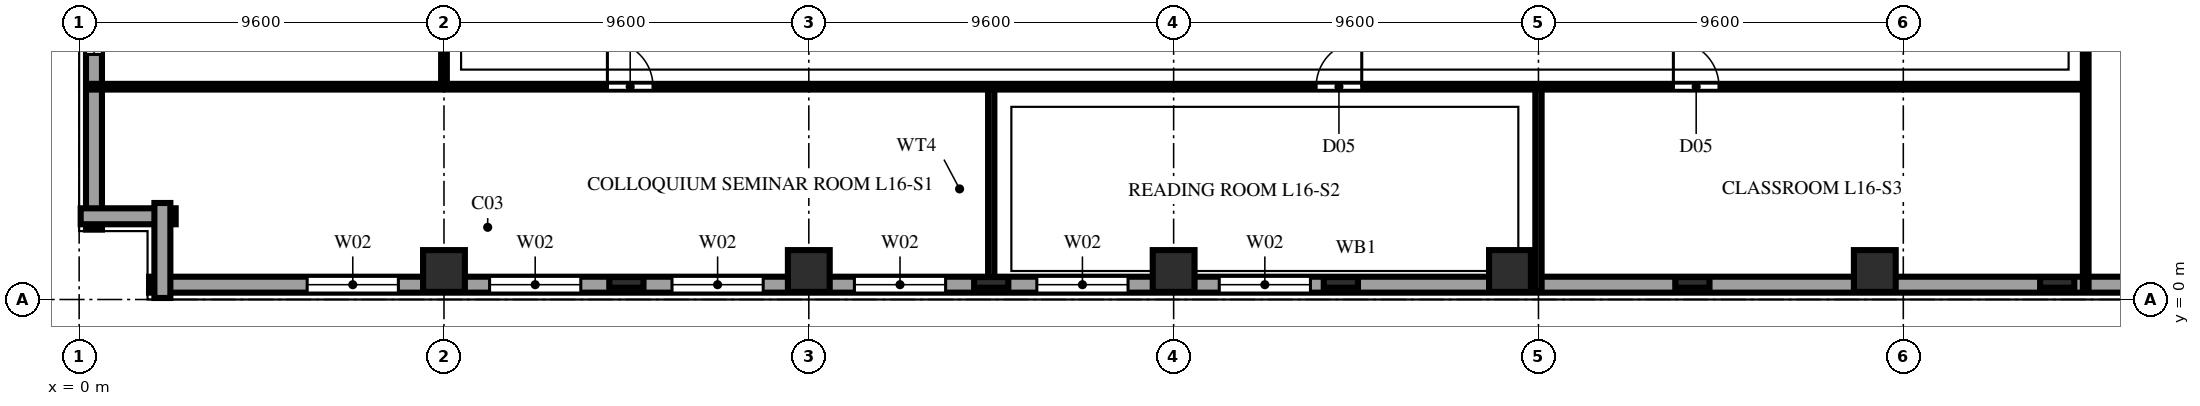
"""IFC4 building model, lengths in metres.
Left out: names, types, materials, properties, quantities, classifications, styles, units other than length and angle.
Written with IfcOpenShell. Run it as: python <this file> out.ifc"""

import sys

from ifc_helpers import new_model, si_unit, direction, frame, frame_2d, origin, origin_2d, place, context, subcontext, project, spatial, rectangle, extrude, element, fill, save


model = new_model("IFC4")
c1 = context("Model", 3, precision=1e-05, world=origin(), true_north=direction((0.0, 1.0)))
c2 = subcontext(c1, "Body", "Model", "MODEL_VIEW")
j1 = project(units=[si_unit("LENGTHUNIT", "METRE"), si_unit("PLANEANGLEUNIT", "RADIAN")], contexts=[c1])
p1 = place(None, origin())
s1 = spatial("IfcSite", under=j1, at=p1, CompositionType="ELEMENT")
p2 = place(p1, origin())
s2 = spatial("IfcBuilding", under=s1, at=p2, CompositionType="ELEMENT")
p3 = place(p2, frame((0.0, 0.0, 66.0)))
s3 = spatial("IfcBuildingStorey", under=s2, at=p3, CompositionType="ELEMENT", Elevation=66.0)
for number, where, z_axis, x_axis in (
    (1, (9.6, 0.75, 0.0), (0.0, 0.0, 1.0), (1.0, 0.0, 0.0)),
    (2, (19.2, 0.75, 0.0), (0.0, 0.0, 1.0), (1.0, 0.0, 0.0)),
    (3, (28.8, 0.75, 0.0), (0.0, 0.0, 1.0), (1.0, 0.0, 0.0)),
    (4, (37.65, 0.75, 0.0), (0.0, 0.0, 1.0), (1.0, 0.0, 0.0)),
    (5, (47.25, 0.75, 0.0), (0.0, 0.0, 1.0), (1.0, 0.0, 0.0)),
):
    element("IfcColumn", number, at=place(p3, frame(where, z_axis=z_axis, x_axis=x_axis)), inside=s3, PredefinedType="COLUMN", context=c2, shape_type="SweptSolid", body=[
        extrude(rectangle(XDim=1.1, YDim=1.1, at=origin_2d()), origin(), (0.0, 0.0, 1.0), 3.8),
    ])
for number, where, z_axis, x_axis in (
    (6, (14.4, 0.45, 0.0), (0.0, 0.0, 1.0), (1.0, 0.0, 0.0)),
    (7, (24.0, 0.45, 0.0), (0.0, 0.0, 1.0), (1.0, 0.0, 0.0)),
    (8, (33.2, 0.45, 0.0), (0.0, 0.0, 1.0), (1.0, 0.0, 0.0)),
    (9, (42.45, 0.45, 0.0), (0.0, 0.0, 1.0), (1.0, 0.0, 0.0)),
    (10, (52.05, 0.45, 0.0), (0.0, 0.0, 1.0), (1.0, 0.0, 0.0)),
):
    element("IfcColumn", number, at=place(p3, frame(where, z_axis=z_axis, x_axis=x_axis)), inside=s3, PredefinedType="PILASTER", context=c2, shape_type="SweptSolid", body=[
        extrude(rectangle(XDim=0.9, YDim=0.28, at=origin_2d()), origin(), (0.0, 0.0, 1.0), 3.8),
    ])
p4 = place(p3, frame((1.84, 0.39, 0.0), z_axis=(0.0, 0.0, 1.0), x_axis=(1.0, 0.0, 0.0)))
e11 = element("IfcWall", 11, at=p4, inside=s3, PredefinedType="SOLIDWALL", context=c2, shape_type="SweptSolid", body=[
    extrude(rectangle(XDim=63.52, YDim=0.42, at=frame_2d((31.76, 0.0))), origin(), (0.0, 0.0, 1.0), 3.54),
])
p5 = place(p4, frame((4.16, 0.0, 0.85)))
e12 = element("IfcOpeningElement", 12, at=p5, cuts=e11, PredefinedType="OPENING", context=c2, shape_type="SweptSolid", body=[
    extrude(rectangle(XDim=2.4, YDim=1.85, at=frame_2d((1.2, 0.925))), frame((0.0, 0.222, 0.0), z_axis=(0.0, -1.0, 0.0), x_axis=(1.0, 0.0, 0.0)), (0.0, 0.0, 1.0), 0.444),
])
p6 = place(p4, frame((8.96, 0.0, 0.85)))
e13 = element("IfcOpeningElement", 13, at=p6, cuts=e11, PredefinedType="OPENING", context=c2, shape_type="SweptSolid", body=[
    extrude(rectangle(XDim=2.4, YDim=1.85, at=frame_2d((1.2, 0.925))), frame((0.0, 0.222, 0.0), z_axis=(0.0, -1.0, 0.0), x_axis=(1.0, 0.0, 0.0)), (0.0, 0.0, 1.0), 0.444),
])
p7 = place(p4, frame((13.76, 0.0, 0.85)))
e14 = element("IfcOpeningElement", 14, at=p7, cuts=e11, PredefinedType="OPENING", context=c2, shape_type="SweptSolid", body=[
    extrude(rectangle(XDim=2.4, YDim=1.85, at=frame_2d((1.2, 0.925))), frame((0.0, 0.222, 0.0), z_axis=(0.0, -1.0, 0.0), x_axis=(1.0, 0.0, 0.0)), (0.0, 0.0, 1.0), 0.444),
])
p8 = place(p4, frame((18.56, 0.0, 0.85)))
e15 = element("IfcOpeningElement", 15, at=p8, cuts=e11, PredefinedType="OPENING", context=c2, shape_type="SweptSolid", body=[
    extrude(rectangle(XDim=2.4, YDim=1.85, at=frame_2d((1.2, 0.925))), frame((0.0, 0.222, 0.0), z_axis=(0.0, -1.0, 0.0), x_axis=(1.0, 0.0, 0.0)), (0.0, 0.0, 1.0), 0.444),
])
p9 = place(p4, frame((23.36, 0.0, 0.85)))
e16 = element("IfcOpeningElement", 16, at=p9, cuts=e11, PredefinedType="OPENING", context=c2, shape_type="SweptSolid", body=[
    extrude(rectangle(XDim=2.4, YDim=1.85, at=frame_2d((1.2, 0.925))), frame((0.0, 0.222, 0.0), z_axis=(0.0, -1.0, 0.0), x_axis=(1.0, 0.0, 0.0)), (0.0, 0.0, 1.0), 0.444),
])
p10 = place(p4, frame((28.16, 0.0, 0.85)))
e17 = element("IfcOpeningElement", 17, at=p10, cuts=e11, PredefinedType="OPENING", context=c2, shape_type="SweptSolid", body=[
    extrude(rectangle(XDim=2.4, YDim=1.85, at=frame_2d((1.2, 0.925))), frame((0.0, 0.222, 0.0), z_axis=(0.0, -1.0, 0.0), x_axis=(1.0, 0.0, 0.0)), (0.0, 0.0, 1.0), 0.444),
])
p11 = place(p3, frame((0.39, 65.36, 0.0), z_axis=(0.0, 0.0, 1.0), x_axis=(0.0, -1.0, 0.0)))
e18 = element("IfcWall", 18, at=p11, inside=s3, PredefinedType="SOLIDWALL", context=c2, shape_type="SweptSolid", body=[
    extrude(rectangle(XDim=63.52, YDim=0.42, at=frame_2d((31.76, 0.0))), origin(), (0.0, 0.0, 1.0), 3.54),
])
p12 = place(p11, frame((4.885, 0.0, 0.9)))
e19 = element("IfcOpeningElement", 19, at=p12, cuts=e18, PredefinedType="OPENING", context=c2, shape_type="SweptSolid", body=[
    extrude(rectangle(XDim=0.95, YDim=1.85, at=frame_2d((0.475, 0.925))), frame((0.0, 0.222, 0.0), z_axis=(0.0, -1.0, 0.0), x_axis=(1.0, 0.0, 0.0)), (0.0, 0.0, 1.0), 0.444),
])
p13 = place(p11, frame((9.41, 0.0, 0.9)))
e20 = element("IfcOpeningElement", 20, at=p13, cuts=e18, PredefinedType="OPENING", context=c2, shape_type="SweptSolid", body=[
    extrude(rectangle(XDim=1.5, YDim=1.85, at=frame_2d((0.75, 0.925))), frame((0.0, 0.222, 0.0), z_axis=(0.0, -1.0, 0.0), x_axis=(1.0, 0.0, 0.0)), (0.0, 0.0, 1.0), 0.444),
])
p14 = place(p11, frame((14.485, 0.0, 0.9)))
e21 = element("IfcOpeningElement", 21, at=p14, cuts=e18, PredefinedType="OPENING", context=c2, shape_type="SweptSolid", body=[
    extrude(rectangle(XDim=0.95, YDim=1.85, at=frame_2d((0.475, 0.925))), frame((0.0, 0.222, 0.0), z_axis=(0.0, -1.0, 0.0), x_axis=(1.0, 0.0, 0.0)), (0.0, 0.0, 1.0), 0.444),
])
p15 = place(p11, frame((19.01, 0.0, 0.9)))
e22 = element("IfcOpeningElement", 22, at=p15, cuts=e18, PredefinedType="OPENING", context=c2, shape_type="SweptSolid", body=[
    extrude(rectangle(XDim=1.5, YDim=1.85, at=frame_2d((0.75, 0.925))), frame((0.0, 0.222, 0.0), z_axis=(0.0, -1.0, 0.0), x_axis=(1.0, 0.0, 0.0)), (0.0, 0.0, 1.0), 0.444),
])
p16 = place(p11, frame((24.085, 0.0, 0.9)))
e23 = element("IfcOpeningElement", 23, at=p16, cuts=e18, PredefinedType="OPENING", context=c2, shape_type="SweptSolid", body=[
    extrude(rectangle(XDim=0.95, YDim=1.85, at=frame_2d((0.475, 0.925))), frame((0.0, 0.222, 0.0), z_axis=(0.0, -1.0, 0.0), x_axis=(1.0, 0.0, 0.0)), (0.0, 0.0, 1.0), 0.444),
])
p17 = place(p11, frame((28.61, 0.0, 0.9)))
e24 = element("IfcOpeningElement", 24, at=p17, cuts=e18, PredefinedType="OPENING", context=c2, shape_type="SweptSolid", body=[
    extrude(rectangle(XDim=1.5, YDim=1.85, at=frame_2d((0.75, 0.925))), frame((0.0, 0.222, 0.0), z_axis=(0.0, -1.0, 0.0), x_axis=(1.0, 0.0, 0.0)), (0.0, 0.0, 1.0), 0.444),
])
p18 = place(p11, frame((33.685, 0.0, 0.9)))
e25 = element("IfcOpeningElement", 25, at=p18, cuts=e18, PredefinedType="OPENING", context=c2, shape_type="SweptSolid", body=[
    extrude(rectangle(XDim=0.95, YDim=1.85, at=frame_2d((0.475, 0.925))), frame((0.0, 0.222, 0.0), z_axis=(0.0, -1.0, 0.0), x_axis=(1.0, 0.0, 0.0)), (0.0, 0.0, 1.0), 0.444),
])
p19 = place(p11, frame((38.21, 0.0, 0.9)))
e26 = element("IfcOpeningElement", 26, at=p19, cuts=e18, PredefinedType="OPENING", context=c2, shape_type="SweptSolid", body=[
    extrude(rectangle(XDim=1.5, YDim=1.85, at=frame_2d((0.75, 0.925))), frame((0.0, 0.222, 0.0), z_axis=(0.0, -1.0, 0.0), x_axis=(1.0, 0.0, 0.0)), (0.0, 0.0, 1.0), 0.444),
])
p20 = place(p11, frame((43.285, 0.0, 0.9)))
e27 = element("IfcOpeningElement", 27, at=p20, cuts=e18, PredefinedType="OPENING", context=c2, shape_type="SweptSolid", body=[
    extrude(rectangle(XDim=0.95, YDim=1.85, at=frame_2d((0.475, 0.925))), frame((0.0, 0.222, 0.0), z_axis=(0.0, -1.0, 0.0), x_axis=(1.0, 0.0, 0.0)), (0.0, 0.0, 1.0), 0.444),
])
p21 = place(p11, frame((47.81, 0.0, 0.9)))
e28 = element("IfcOpeningElement", 28, at=p21, cuts=e18, PredefinedType="OPENING", context=c2, shape_type="SweptSolid", body=[
    extrude(rectangle(XDim=1.5, YDim=1.85, at=frame_2d((0.75, 0.925))), frame((0.0, 0.222, 0.0), z_axis=(0.0, -1.0, 0.0), x_axis=(1.0, 0.0, 0.0)), (0.0, 0.0, 1.0), 0.444),
])
p22 = place(p11, frame((52.885, 0.0, 0.9)))
e29 = element("IfcOpeningElement", 29, at=p22, cuts=e18, PredefinedType="OPENING", context=c2, shape_type="SweptSolid", body=[
    extrude(rectangle(XDim=0.95, YDim=1.85, at=frame_2d((0.475, 0.925))), frame((0.0, 0.222, 0.0), z_axis=(0.0, -1.0, 0.0), x_axis=(1.0, 0.0, 0.0)), (0.0, 0.0, 1.0), 0.444),
])
p23 = place(p11, frame((57.41, 0.0, 0.9)))
e30 = element("IfcOpeningElement", 30, at=p23, cuts=e18, PredefinedType="OPENING", context=c2, shape_type="SweptSolid", body=[
    extrude(rectangle(XDim=1.5, YDim=1.85, at=frame_2d((0.75, 0.925))), frame((0.0, 0.222, 0.0), z_axis=(0.0, -1.0, 0.0), x_axis=(1.0, 0.0, 0.0)), (0.0, 0.0, 1.0), 0.444),
])
for number, where, z_axis, x_axis in (
    (31, (0.04, 2.19, 0.0), (0.0, 0.0, 1.0), (1.0, 0.0, 0.0)),
    (32, (2.19, 2.54, 0.0), (0.0, 0.0, 1.0), (0.0, -1.0, 0.0)),
):
    element("IfcWall", number, at=place(p3, frame(where, z_axis=z_axis, x_axis=x_axis)), inside=s3, PredefinedType="SOLIDWALL", context=c2, shape_type="SweptSolid", body=[
        extrude(rectangle(XDim=2.5, YDim=0.42, at=frame_2d((1.25, 0.0))), origin(), (0.0, 0.0, 1.0), 3.54),
    ])
p24 = place(p3, frame((9.6, 5.6, 0.0), z_axis=(0.0, 0.0, 1.0), x_axis=(0.0, 1.0, 0.0)))
e33 = element("IfcWall", 33, at=p24, inside=s3, PredefinedType="PARTITIONING", context=c2, shape_type="SweptSolid", body=[
    extrude(rectangle(XDim=4.0, YDim=0.15, at=frame_2d((2.0, 0.0))), origin(), (0.0, 0.0, 1.0), 2.923),
])
for number, where, z_axis, x_axis in (
    (34, (24.0, 0.22, 0.0), (0.0, 0.0, 1.0), (0.0, 1.0, 0.0)),
    (35, (38.4, 0.22, 0.0), (0.0, 0.0, 1.0), (0.0, 1.0, 0.0)),
):
    element("IfcWall", number, at=place(p3, frame(where, z_axis=z_axis, x_axis=x_axis)), inside=s3, PredefinedType="PLUMBINGWALL", context=c2, shape_type="SweptSolid", body=[
        extrude(rectangle(XDim=5.38, YDim=0.165, at=frame_2d((2.69, 0.0))), origin(), (0.0, 0.0, 1.0), 3.54),
    ])
p25 = place(p3, frame((0.22, 5.6, 0.0), z_axis=(0.0, 0.0, 1.0), x_axis=(1.0, 0.0, 0.0)))
e36 = element("IfcWall", 36, at=p25, inside=s3, PredefinedType="PARTITIONING", context=c2, shape_type="SweptSolid", body=[
    extrude(rectangle(XDim=52.58, YDim=0.15, at=frame_2d((26.29, 0.0))), origin(), (0.0, 0.0, 1.0), 3.54),
])
p26 = place(p25, frame((13.68, 0.0, 0.0)))
e37 = element("IfcOpeningElement", 37, at=p26, cuts=e36, PredefinedType="OPENING", context=c2, shape_type="SweptSolid", body=[
    extrude(rectangle(XDim=1.2, YDim=2.2, at=frame_2d((0.6, 1.1))), frame((0.0, 0.087, 0.0), z_axis=(0.0, -1.0, 0.0), x_axis=(1.0, 0.0, 0.0)), (0.0, 0.0, 1.0), 0.174),
])
p27 = place(p25, frame((32.33, 0.0, 0.0)))
e38 = element("IfcOpeningElement", 38, at=p27, cuts=e36, PredefinedType="OPENING", context=c2, shape_type="SweptSolid", body=[
    extrude(rectangle(XDim=1.2, YDim=2.2, at=frame_2d((0.6, 1.1))), frame((0.0, 0.087, 0.0), z_axis=(0.0, -1.0, 0.0), x_axis=(1.0, 0.0, 0.0)), (0.0, 0.0, 1.0), 0.174),
])
p28 = place(p25, frame((41.73, 0.0, 0.0)))
e39 = element("IfcOpeningElement", 39, at=p28, cuts=e36, PredefinedType="OPENING", context=c2, shape_type="SweptSolid", body=[
    extrude(rectangle(XDim=1.2, YDim=2.2, at=frame_2d((0.6, 1.1))), frame((0.0, 0.087, 0.0), z_axis=(0.0, -1.0, 0.0), x_axis=(1.0, 0.0, 0.0)), (0.0, 0.0, 1.0), 0.174),
])
p29 = place(p3, frame((52.8, 0.22, 0.0), z_axis=(0.0, 0.0, 1.0), x_axis=(0.0, 1.0, 0.0)))
e40 = element("IfcWall", 40, at=p29, inside=s3, PredefinedType="PARTITIONING", context=c2, shape_type="SweptSolid", body=[
    extrude(rectangle(XDim=37.96, YDim=0.15, at=frame_2d((18.98, 0.0))), origin(), (0.0, 0.0, 1.0), 3.54),
])
p30 = place(p29, frame((13.68, 0.0, 0.0)))
e41 = element("IfcOpeningElement", 41, at=p30, cuts=e40, PredefinedType="OPENING", context=c2, shape_type="SweptSolid", body=[
    extrude(rectangle(XDim=0.95, YDim=2.15, at=frame_2d((0.475, 1.075))), frame((0.0, 0.087, 0.0), z_axis=(0.0, -1.0, 0.0), x_axis=(1.0, 0.0, 0.0)), (0.0, 0.0, 1.0), 0.174),
])
p31 = place(p5, origin())
e42 = element("IfcWindow", 42, at=p31, inside=s3, PartitioningType="TRIPLE_PANEL_VERTICAL", PredefinedType="WINDOW", context=c2, shape_type="SweptSolid", body=[
    extrude(rectangle(XDim=2.4, YDim=1.85, at=frame_2d((1.2, 0.925))), frame((0.0, 0.11, 0.0), z_axis=(0.0, -1.0, 0.0), x_axis=(1.0, 0.0, 0.0)), (0.0, 0.0, 1.0), 0.06),
])
fill(e12, e42)
p32 = place(p6, origin())
e43 = element("IfcWindow", 43, at=p32, inside=s3, PartitioningType="TRIPLE_PANEL_VERTICAL", PredefinedType="WINDOW", context=c2, shape_type="SweptSolid", body=[
    extrude(rectangle(XDim=2.4, YDim=1.85, at=frame_2d((1.2, 0.925))), frame((0.0, 0.11, 0.0), z_axis=(0.0, -1.0, 0.0), x_axis=(1.0, 0.0, 0.0)), (0.0, 0.0, 1.0), 0.06),
])
fill(e13, e43)
p33 = place(p7, origin())
e44 = element("IfcWindow", 44, at=p33, inside=s3, PartitioningType="TRIPLE_PANEL_VERTICAL", PredefinedType="WINDOW", context=c2, shape_type="SweptSolid", body=[
    extrude(rectangle(XDim=2.4, YDim=1.85, at=frame_2d((1.2, 0.925))), frame((0.0, 0.11, 0.0), z_axis=(0.0, -1.0, 0.0), x_axis=(1.0, 0.0, 0.0)), (0.0, 0.0, 1.0), 0.06),
])
fill(e14, e44)
p34 = place(p8, origin())
e45 = element("IfcWindow", 45, at=p34, inside=s3, PartitioningType="TRIPLE_PANEL_VERTICAL", PredefinedType="WINDOW", context=c2, shape_type="SweptSolid", body=[
    extrude(rectangle(XDim=2.4, YDim=1.85, at=frame_2d((1.2, 0.925))), frame((0.0, 0.11, 0.0), z_axis=(0.0, -1.0, 0.0), x_axis=(1.0, 0.0, 0.0)), (0.0, 0.0, 1.0), 0.06),
])
fill(e15, e45)
p35 = place(p9, origin())
e46 = element("IfcWindow", 46, at=p35, inside=s3, PartitioningType="TRIPLE_PANEL_VERTICAL", PredefinedType="WINDOW", context=c2, shape_type="SweptSolid", body=[
    extrude(rectangle(XDim=2.4, YDim=1.85, at=frame_2d((1.2, 0.925))), frame((0.0, 0.11, 0.0), z_axis=(0.0, -1.0, 0.0), x_axis=(1.0, 0.0, 0.0)), (0.0, 0.0, 1.0), 0.06),
])
fill(e16, e46)
p36 = place(p10, origin())
e47 = element("IfcWindow", 47, at=p36, inside=s3, PartitioningType="TRIPLE_PANEL_VERTICAL", PredefinedType="WINDOW", context=c2, shape_type="SweptSolid", body=[
    extrude(rectangle(XDim=2.4, YDim=1.85, at=frame_2d((1.2, 0.925))), frame((0.0, 0.11, 0.0), z_axis=(0.0, -1.0, 0.0), x_axis=(1.0, 0.0, 0.0)), (0.0, 0.0, 1.0), 0.06),
])
fill(e17, e47)
p37 = place(p23, origin())
e48 = element("IfcWindow", 48, at=p37, inside=s3, PartitioningType="DOUBLE_PANEL_VERTICAL", PredefinedType="WINDOW", context=c2, shape_type="SweptSolid", body=[
    extrude(rectangle(XDim=1.5, YDim=1.85, at=frame_2d((0.75, 0.925))), frame((0.0, 0.11, 0.0), z_axis=(0.0, -1.0, 0.0), x_axis=(1.0, 0.0, 0.0)), (0.0, 0.0, 1.0), 0.06),
])
fill(e30, e48)
p38 = place(p26, origin())
e49 = element("IfcDoor", 49, at=p38, inside=s3, OperationType="SINGLE_SWING_LEFT", PredefinedType="DOOR", context=c2, shape_type="SweptSolid", body=[
    extrude(rectangle(XDim=1.2, YDim=2.2, at=frame_2d((0.6, 1.1))), frame((0.0, 0.025, 0.0), z_axis=(0.0, -1.0, 0.0), x_axis=(1.0, 0.0, 0.0)), (0.0, 0.0, 1.0), 0.05),
])
fill(e37, e49)
p39 = place(p27, origin())
e50 = element("IfcDoor", 50, at=p39, inside=s3, OperationType="SINGLE_SWING_RIGHT", PredefinedType="DOOR", context=c2, shape_type="SweptSolid", body=[
    extrude(rectangle(XDim=1.2, YDim=2.2, at=frame_2d((0.6, 1.1))), frame((0.0, 0.025, 0.0), z_axis=(0.0, -1.0, 0.0), x_axis=(1.0, 0.0, 0.0)), (0.0, 0.0, 1.0), 0.05),
])
fill(e38, e50)
p40 = place(p28, origin())
e51 = element("IfcDoor", 51, at=p40, inside=s3, OperationType="SINGLE_SWING_LEFT", PredefinedType="DOOR", context=c2, shape_type="SweptSolid", body=[
    extrude(rectangle(XDim=1.2, YDim=2.2, at=frame_2d((0.6, 1.1))), frame((0.0, 0.025, 0.0), z_axis=(0.0, -1.0, 0.0), x_axis=(1.0, 0.0, 0.0)), (0.0, 0.0, 1.0), 0.05),
])
fill(e39, e51)
save(model, sys.argv[1])
